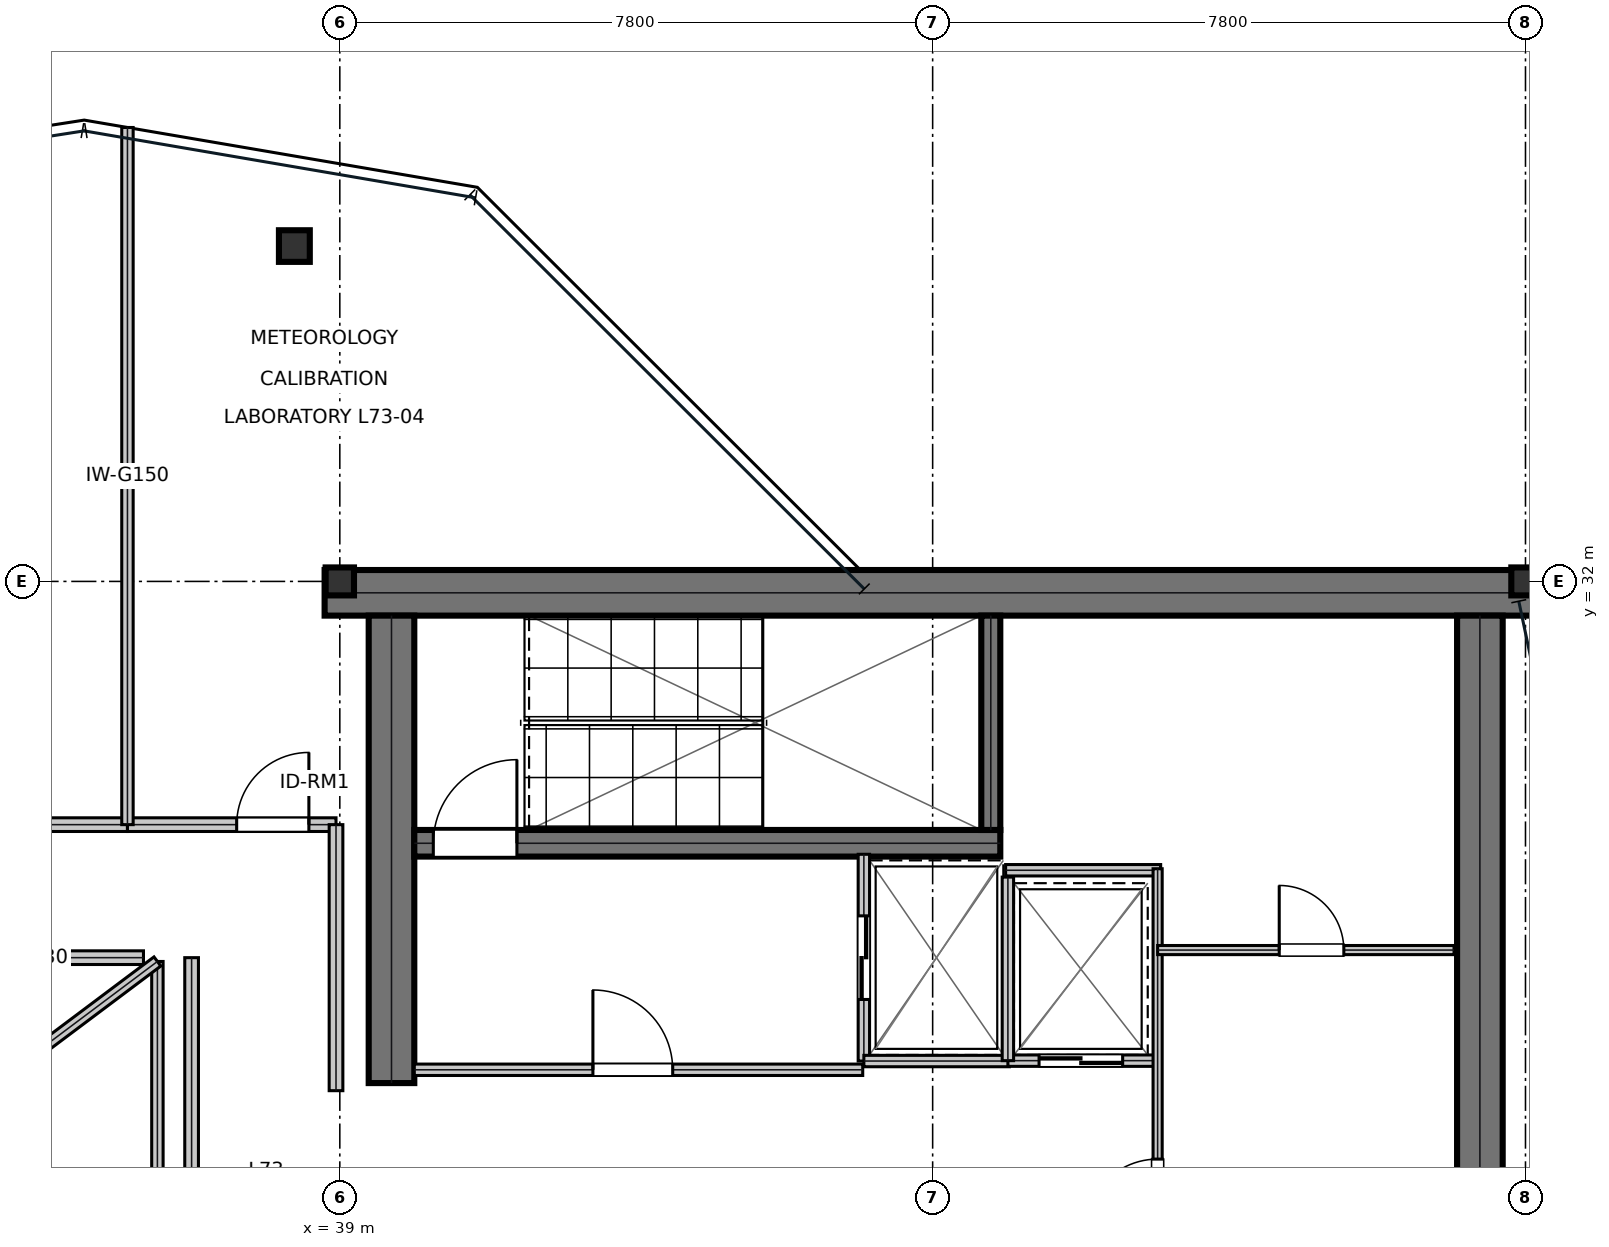
"""IFC4 building model, lengths in metres.
Left out: names, types, materials, properties, quantities, classifications, styles, units other than length and angle.
Written with IfcOpenShell. Run it as: python <this file> out.ifc"""

import sys

from ifc_helpers import new_model, si_unit, direction, frame, frame_2d, origin, origin_2d, place, context, subcontext, project, spatial, rectangle, i_section, extrude, element, fill, save


model = new_model("IFC4")
c1 = context("Model", 3, precision=1e-05, world=origin(), true_north=direction((0.0, 1.0)))
c2 = subcontext(c1, "Body", "Model", "MODEL_VIEW")
j1 = project(units=[si_unit("LENGTHUNIT", "METRE"), si_unit("PLANEANGLEUNIT", "RADIAN")], contexts=[c1])
p1 = place(None, origin())
s1 = spatial("IfcSite", under=j1, at=p1, CompositionType="ELEMENT")
p2 = place(p1, origin())
s2 = spatial("IfcBuilding", under=s1, at=p2, CompositionType="ELEMENT")
p3 = place(p2, frame((0.0, 0.0, 311.4)))
s3 = spatial("IfcBuildingStorey", under=s2, at=p3, CompositionType="ELEMENT", Elevation=311.4)
p4 = place(p3, frame((38.8, 31.85, 0.0), z_axis=(0.0, 0.0, 1.0), x_axis=(1.0, 0.0, 0.0)))
e1 = element("IfcWall", 1, at=p4, inside=s3, PredefinedType="SHEAR", context=c2, shape_type="SweptSolid", body=[
    extrude(rectangle(XDim=16.0, YDim=0.6, at=frame_2d((8.0, 0.0))), origin(), (0.0, 0.0, 1.0), 3.78),
])
p5 = place(p3, frame((39.68, 25.4, 0.0), z_axis=(0.0, 0.0, 1.0), x_axis=(0.0, 1.0, 0.0)))
e2 = element("IfcWall", 2, at=p5, inside=s3, PredefinedType="SHEAR", context=c2, shape_type="SweptSolid", body=[
    extrude(rectangle(XDim=6.15, YDim=0.6, at=frame_2d((3.075, 0.0))), origin(), (0.0, 0.0, 1.0), 3.78),
])
p6 = place(p3, frame((54.0, 16.45, 0.0), z_axis=(0.0, 0.0, 1.0), x_axis=(0.0, 1.0, 0.0)))
e3 = element("IfcWall", 3, at=p6, inside=s3, PredefinedType="SHEAR", context=c2, shape_type="SweptSolid", body=[
    extrude(rectangle(XDim=15.1, YDim=0.6, at=frame_2d((7.55, 0.0))), origin(), (0.0, 0.0, 1.0), 3.78),
])
p7 = place(p3, frame((39.98, 28.555, 0.0), z_axis=(0.0, 0.0, 1.0), x_axis=(1.0, 0.0, 0.0)))
e4 = element("IfcWall", 4, at=p7, inside=s3, PredefinedType="SHEAR", context=c2, shape_type="SweptSolid", body=[
    extrude(rectangle(XDim=7.71, YDim=0.35, at=frame_2d((3.855, 0.0))), origin(), (0.0, 0.0, 1.0), 3.78),
])
p8 = place(p7, frame((0.25, 0.0, 0.0)))
e5 = element("IfcOpeningElement", 5, at=p8, cuts=e4, PredefinedType="OPENING", context=c2, shape_type="SweptSolid", body=[
    extrude(rectangle(XDim=1.1, YDim=2.15, at=frame_2d((0.55, 1.075))), frame((0.0, 0.185, 0.0), z_axis=(0.0, -1.0, 0.0), x_axis=(1.0, 0.0, 0.0)), (0.0, 0.0, 1.0), 0.37),
])
p9 = place(p3, frame((47.565, 28.73, 0.0), z_axis=(0.0, 0.0, 1.0), x_axis=(0.0, 1.0, 0.0)))
e6 = element("IfcWall", 6, at=p9, inside=s3, PredefinedType="SHEAR", context=c2, shape_type="SweptSolid", body=[
    extrude(rectangle(XDim=2.82, YDim=0.25, at=frame_2d((1.41, 0.0))), origin(), (0.0, 0.0, 1.0), 3.78),
])
for number, where, z_axis, x_axis in (
    (7, (39.0, 32.0, 0.0), (0.0, 0.0, 1.0), (1.0, 0.0, 0.0)),
    (8, (54.6, 32.0, 0.0), (0.0, 0.0, 1.0), (1.0, 0.0, 0.0)),
):
    element("IfcColumn", number, at=place(p3, frame(where, z_axis=z_axis, x_axis=x_axis)), inside=s3, PredefinedType="COLUMN", context=c2, shape_type="SweptSolid", body=[
        extrude(i_section(OverallWidth=0.373, OverallDepth=0.368, WebThickness=0.015, FlangeThickness=0.024, at=origin_2d()), origin(), (0.0, 0.0, 1.0), 4.044),
    ])
p10 = place(p3, frame((38.402, 36.412, 0.016), z_axis=(-0.003523326101, -0.020957715601, 0.999774154662), x_axis=(0.986161178363, -0.165789415493, 0.0)))
e9 = element("IfcColumn", 9, at=p10, inside=s3, PredefinedType="COLUMN", context=c2, shape_type="SweptSolid", body=[
    extrude(i_section(OverallWidth=0.406, OverallDepth=0.416, WebThickness=0.03, FlangeThickness=0.048, at=origin_2d()), origin(), (0.0, 0.0, 1.0), 4.019),
])
p11 = place(p3, frame((39.98, 25.575, 0.0), z_axis=(0.0, 0.0, 1.0), x_axis=(1.0, 0.0, 0.0)))
e10 = element("IfcWall", 10, at=p11, inside=s3, PredefinedType="PARTITIONING", context=c2, shape_type="SweptSolid", body=[
    extrude(rectangle(XDim=5.9, YDim=0.15, at=frame_2d((2.95, 0.0))), origin(), (0.0, 0.0, 1.0), 3.78),
])
p12 = place(p11, frame((2.35, 0.0, 0.0)))
e11 = element("IfcOpeningElement", 11, at=p12, cuts=e10, PredefinedType="OPENING", context=c2, shape_type="SweptSolid", body=[
    extrude(rectangle(XDim=1.05, YDim=2.15, at=frame_2d((0.525, 1.075))), frame((0.0, 0.085, 0.0), z_axis=(0.0, -1.0, 0.0), x_axis=(1.0, 0.0, 0.0)), (0.0, 0.0, 1.0), 0.17),
])
p13 = place(p3, frame((45.895, 25.69, 0.0), z_axis=(0.0, 0.0, 1.0), x_axis=(0.0, 1.0, 0.0)))
e12 = element("IfcWall", 12, at=p13, inside=s3, PredefinedType="PARTITIONING", context=c2, shape_type="SweptSolid", body=[
    extrude(rectangle(XDim=2.72, YDim=0.15, at=frame_2d((1.36, 0.0))), origin(), (0.0, 0.0, 1.0), 3.78),
])
p14 = place(p13, frame((0.81, 0.0, 0.0)))
e13 = element("IfcOpeningElement", 13, at=p14, cuts=e12, PredefinedType="OPENING", context=c2, shape_type="SweptSolid", body=[
    extrude(rectangle(XDim=1.1, YDim=2.15, at=frame_2d((0.55, 1.075))), frame((0.0, 0.085, 0.0), z_axis=(0.0, -1.0, 0.0), x_axis=(1.0, 0.0, 0.0)), (0.0, 0.0, 1.0), 0.17),
])
p15 = place(p3, frame((45.895, 25.69, 0.0), z_axis=(0.0, 0.0, 1.0), x_axis=(1.0, 0.0, 0.0)))
e14 = element("IfcWall", 14, at=p15, inside=s3, PredefinedType="PARTITIONING", context=c2, shape_type="SweptSolid", body=[
    extrude(rectangle(XDim=1.915, YDim=0.15, at=frame_2d((0.958, 0.0))), origin(), (0.0, 0.0, 1.0), 3.78),
])
p16 = place(p3, frame((47.79, 25.695, 0.0), z_axis=(0.0, 0.0, 1.0), x_axis=(1.0, 0.0, 0.0)))
e15 = element("IfcWall", 15, at=p16, inside=s3, PredefinedType="PARTITIONING", context=c2, shape_type="SweptSolid", body=[
    extrude(rectangle(XDim=1.92, YDim=0.15, at=frame_2d((0.96, 0.0))), origin(), (0.0, 0.0, 1.0), 3.78),
])
p17 = place(p16, frame((0.41, 0.0, 0.0)))
e16 = element("IfcOpeningElement", 16, at=p17, cuts=e15, PredefinedType="OPENING", context=c2, shape_type="SweptSolid", body=[
    extrude(rectangle(XDim=1.1, YDim=2.15, at=frame_2d((0.55, 1.075))), frame((0.0, 0.085, 0.0), z_axis=(0.0, -1.0, 0.0), x_axis=(1.0, 0.0, 0.0)), (0.0, 0.0, 1.0), 0.17),
])
p18 = place(p3, frame((47.79, 25.695, 0.0), z_axis=(0.0, 0.0, 1.0), x_axis=(0.0, 1.0, 0.0)))
e17 = element("IfcWall", 17, at=p18, inside=s3, PredefinedType="PARTITIONING", context=c2, shape_type="SweptSolid", body=[
    extrude(rectangle(XDim=2.415, YDim=0.15, at=frame_2d((1.208, 0.0))), origin(), (0.0, 0.0, 1.0), 3.78),
])
p19 = place(p3, frame((47.76, 28.2, 0.0), z_axis=(0.0, 0.0, 1.0), x_axis=(1.0, 0.0, 0.0)))
e18 = element("IfcWall", 18, at=p19, inside=s3, PredefinedType="PARTITIONING", context=c2, shape_type="SweptSolid", body=[
    extrude(rectangle(XDim=2.04, YDim=0.15, at=frame_2d((1.02, 0.0))), origin(), (0.0, 0.0, 1.0), 3.78),
])
p20 = place(p3, frame((49.76, 22.5, 0.0), z_axis=(0.0, 0.0, 1.0), x_axis=(0.0, 1.0, 0.0)))
e19 = element("IfcWall", 19, at=p20, inside=s3, PredefinedType="PARTITIONING", context=c2, shape_type="SweptSolid", body=[
    extrude(rectangle(XDim=5.72, YDim=0.12, at=frame_2d((2.86, 0.0))), origin(), (0.0, 0.0, 1.0), 3.78),
])
p21 = place(p20, frame((0.95, 0.0, 0.0)))
e20 = element("IfcOpeningElement", 20, at=p21, cuts=e19, PredefinedType="OPENING", context=c2, shape_type="SweptSolid", body=[
    extrude(rectangle(XDim=0.95, YDim=2.15, at=frame_2d((0.475, 1.075))), frame((0.0, 0.07, 0.0), z_axis=(0.0, -1.0, 0.0), x_axis=(1.0, 0.0, 0.0)), (0.0, 0.0, 1.0), 0.14),
])
p22 = place(p3, frame((49.76, 27.15, 0.0), z_axis=(0.0, 0.0, 1.0), x_axis=(1.0, 0.0, 0.0)))
e21 = element("IfcWall", 21, at=p22, inside=s3, PredefinedType="PARTITIONING", context=c2, shape_type="SweptSolid", body=[
    extrude(rectangle(XDim=3.9, YDim=0.12, at=frame_2d((1.95, 0.0))), origin(), (0.0, 0.0, 1.0), 3.78),
])
p23 = place(p22, frame((1.6, 0.0, 0.0)))
e22 = element("IfcOpeningElement", 22, at=p23, cuts=e21, PredefinedType="OPENING", context=c2, shape_type="SweptSolid", body=[
    extrude(rectangle(XDim=0.85, YDim=2.15, at=frame_2d((0.425, 1.075))), frame((0.0, 0.07, 0.0), z_axis=(0.0, -1.0, 0.0), x_axis=(1.0, 0.0, 0.0)), (0.0, 0.0, 1.0), 0.14),
])
p24 = place(p3, frame((26.35, 27.05, 0.0), z_axis=(0.0, 0.0, 1.0), x_axis=(1.0, 0.0, 0.0)))
e23 = element("IfcWall", 23, at=p24, inside=s3, PredefinedType="SOLIDWALL", context=c2, shape_type="SweptSolid", body=[
    extrude(rectangle(XDim=10.067, YDim=0.18, at=frame_2d((5.033, 0.0))), origin(), (0.0, 0.0, 1.0), 3.24),
])
p25 = place(p24, frame((4.583, 0.0, 0.0)))
e24 = element("IfcOpeningElement", 24, at=p25, cuts=e23, PredefinedType="OPENING", context=c2, shape_type="SweptSolid", body=[
    extrude(rectangle(XDim=0.9, YDim=2.15, at=frame_2d((0.45, 1.075))), frame((0.0, 0.1, 0.0), z_axis=(0.0, -1.0, 0.0), x_axis=(1.0, 0.0, 0.0)), (0.0, 0.0, 1.0), 0.2),
])
p26 = place(p3, frame((27.314, 28.8, 0.0), z_axis=(0.0, 0.0, 1.0), x_axis=(1.0, 0.0, 0.0)))
e25 = element("IfcWall", 25, at=p26, inside=s3, PredefinedType="SOLIDWALL", context=c2, shape_type="SweptSolid", body=[
    extrude(rectangle(XDim=8.892, YDim=0.18, at=frame_2d((4.446, 0.0))), origin(), (0.0, 0.0, 1.0), 3.24),
])
p27 = place(p26, frame((3.996, 0.0, 0.0)))
e26 = element("IfcOpeningElement", 26, at=p27, cuts=e25, PredefinedType="OPENING", context=c2, shape_type="SweptSolid", body=[
    extrude(rectangle(XDim=0.9, YDim=2.15, at=frame_2d((0.45, 1.075))), frame((0.0, 0.1, 0.0), z_axis=(0.0, -1.0, 0.0), x_axis=(1.0, 0.0, 0.0)), (0.0, 0.0, 1.0), 0.2),
])
p28 = place(p3, frame((36.206, 28.8, 0.0), z_axis=(0.0, 0.0, 1.0), x_axis=(1.0, 0.0, 0.0)))
e27 = element("IfcWall", 27, at=p28, inside=s3, PredefinedType="SOLIDWALL", context=c2, shape_type="SweptSolid", body=[
    extrude(rectangle(XDim=2.744, YDim=0.18, at=frame_2d((1.372, 0.0))), origin(), (0.0, 0.0, 1.0), 3.78),
])
p29 = place(p28, frame((1.437, 0.0, 0.0)))
e28 = element("IfcOpeningElement", 28, at=p29, cuts=e27, PredefinedType="OPENING", context=c2, shape_type="SweptSolid", body=[
    extrude(rectangle(XDim=0.95, YDim=2.15, at=frame_2d((0.475, 1.075))), frame((0.0, 0.1, 0.0), z_axis=(0.0, -1.0, 0.0), x_axis=(1.0, 0.0, 0.0)), (0.0, 0.0, 1.0), 0.2),
])
p30 = place(p3, frame((37.05, 19.2, 0.0), z_axis=(0.0, 0.0, 1.0), x_axis=(0.0, 1.0, 0.0)))
e29 = element("IfcWall", 29, at=p30, inside=s3, PredefinedType="SOLIDWALL", context=c2, shape_type="SweptSolid", body=[
    extrude(rectangle(XDim=7.85, YDim=0.18, at=frame_2d((3.925, 0.0))), origin(), (0.0, 0.0, 1.0), 3.51),
])
p31 = place(p3, frame((38.95, 25.3, 0.0), z_axis=(0.0, 0.0, 1.0), x_axis=(0.0, 1.0, 0.0)))
e30 = element("IfcWall", 30, at=p31, inside=s3, PredefinedType="SOLIDWALL", context=c2, shape_type="SweptSolid", body=[
    extrude(rectangle(XDim=3.5, YDim=0.18, at=frame_2d((1.75, 0.0))), origin(), (0.0, 0.0, 1.0), 3.51),
])
p32 = place(p3, frame((36.206, 28.8, 0.0), z_axis=(0.0, 0.0, 1.0), x_axis=(0.0, 1.0, 0.0)))
e31 = element("IfcWall", 31, at=p32, inside=s3, PredefinedType="MOVABLE", context=c2, shape_type="SweptSolid", body=[
    extrude(rectangle(XDim=9.172, YDim=0.15, at=frame_2d((4.586, 0.0))), origin(), (0.0, 0.0, 1.0), 3.24),
])
p33 = place(p3, frame((36.6, 21.0, 0.0), z_axis=(0.0, 0.0, 1.0), x_axis=(0.0, 1.0, 0.0)))
e32 = element("IfcWall", 32, at=p33, inside=s3, PredefinedType="MOVABLE", context=c2, shape_type="SweptSolid", body=[
    extrude(rectangle(XDim=6.0, YDim=0.15, at=frame_2d((3.0, 0.0))), origin(), (0.0, 0.0, 1.0), 3.78),
])
p34 = place(p3, frame((36.6, 27.0, 0.0), z_axis=(0.0, 0.0, 1.0), x_axis=(-0.8, -0.6, 0.0)))
e33 = element("IfcWall", 33, at=p34, inside=s3, PredefinedType="MOVABLE", context=c2, shape_type="SweptSolid", body=[
    extrude(rectangle(XDim=5.0, YDim=0.15, at=frame_2d((2.5, 0.0))), origin(), (0.0, 0.0, 1.0), 3.78),
])
p35 = place(p12, origin())
e34 = element("IfcDoor", 34, at=p35, inside=s3, OperationType="SINGLE_SWING_LEFT", PredefinedType="DOOR", context=c2, shape_type="SweptSolid", body=[
    extrude(rectangle(XDim=1.05, YDim=2.15, at=frame_2d((0.525, 1.075))), frame((0.0, 0.025, 0.0), z_axis=(0.0, -1.0, 0.0), x_axis=(1.0, 0.0, 0.0)), (0.0, 0.0, 1.0), 0.05),
])
fill(e11, e34)
p36 = place(p14, frame((1.1, 0.0, 0.0), z_axis=(0.0, 0.0, 1.0), x_axis=(-1.0, 0.0, 0.0)))
e35 = element("IfcDoor", 35, at=p36, inside=s3, OperationType="DOUBLE_DOOR_SLIDING", PredefinedType="DOOR", context=c2, shape_type="SweptSolid", body=[
    extrude(rectangle(XDim=1.1, YDim=2.15, at=frame_2d((0.55, 1.075))), frame((0.0, 0.025, 0.0), z_axis=(0.0, -1.0, 0.0), x_axis=(1.0, 0.0, 0.0)), (0.0, 0.0, 1.0), 0.05),
])
fill(e13, e35)
p37 = place(p17, frame((1.1, 0.0, 0.0), z_axis=(0.0, 0.0, 1.0), x_axis=(-1.0, 0.0, 0.0)))
e36 = element("IfcDoor", 36, at=p37, inside=s3, OperationType="DOUBLE_DOOR_SLIDING", PredefinedType="DOOR", context=c2, shape_type="SweptSolid", body=[
    extrude(rectangle(XDim=1.1, YDim=2.15, at=frame_2d((0.55, 1.075))), frame((0.0, 0.025, 0.0), z_axis=(0.0, -1.0, 0.0), x_axis=(1.0, 0.0, 0.0)), (0.0, 0.0, 1.0), 0.05),
])
fill(e16, e36)
p38 = place(p21, origin())
e37 = element("IfcDoor", 37, at=p38, inside=s3, OperationType="SINGLE_SWING_LEFT", PredefinedType="DOOR", context=c2, shape_type="SweptSolid", body=[
    extrude(rectangle(XDim=0.95, YDim=2.15, at=frame_2d((0.475, 1.075))), frame((0.0, 0.025, 0.0), z_axis=(0.0, -1.0, 0.0), x_axis=(1.0, 0.0, 0.0)), (0.0, 0.0, 1.0), 0.05),
])
fill(e20, e37)
p39 = place(p23, origin())
e38 = element("IfcDoor", 38, at=p39, inside=s3, OperationType="SINGLE_SWING_LEFT", PredefinedType="DOOR", context=c2, shape_type="SweptSolid", body=[
    extrude(rectangle(XDim=0.85, YDim=2.15, at=frame_2d((0.425, 1.075))), frame((0.0, 0.025, 0.0), z_axis=(0.0, -1.0, 0.0), x_axis=(1.0, 0.0, 0.0)), (0.0, 0.0, 1.0), 0.05),
])
fill(e22, e38)
p40 = place(p29, origin())
e39 = element("IfcDoor", 39, at=p40, inside=s3, OperationType="SINGLE_SWING_RIGHT", PredefinedType="DOOR", context=c2, shape_type="SweptSolid", body=[
    extrude(rectangle(XDim=0.95, YDim=2.15, at=frame_2d((0.475, 1.075))), frame((0.0, 0.025, 0.0), z_axis=(0.0, -1.0, 0.0), x_axis=(1.0, 0.0, 0.0)), (0.0, 0.0, 1.0), 0.05),
])
fill(e28, e39)
p41 = place(p8, origin())
e40 = element("IfcDoor", 40, at=p41, inside=s3, OperationType="SINGLE_SWING_RIGHT", PredefinedType="DOOR", context=c2, shape_type="SweptSolid", body=[
    extrude(rectangle(XDim=1.1, YDim=2.15, at=frame_2d((0.55, 1.075))), frame((0.0, 0.025, 0.0), z_axis=(0.0, -1.0, 0.0), x_axis=(1.0, 0.0, 0.0)), (0.0, 0.0, 1.0), 0.05),
])
fill(e5, e40)
save(model, sys.argv[1])
